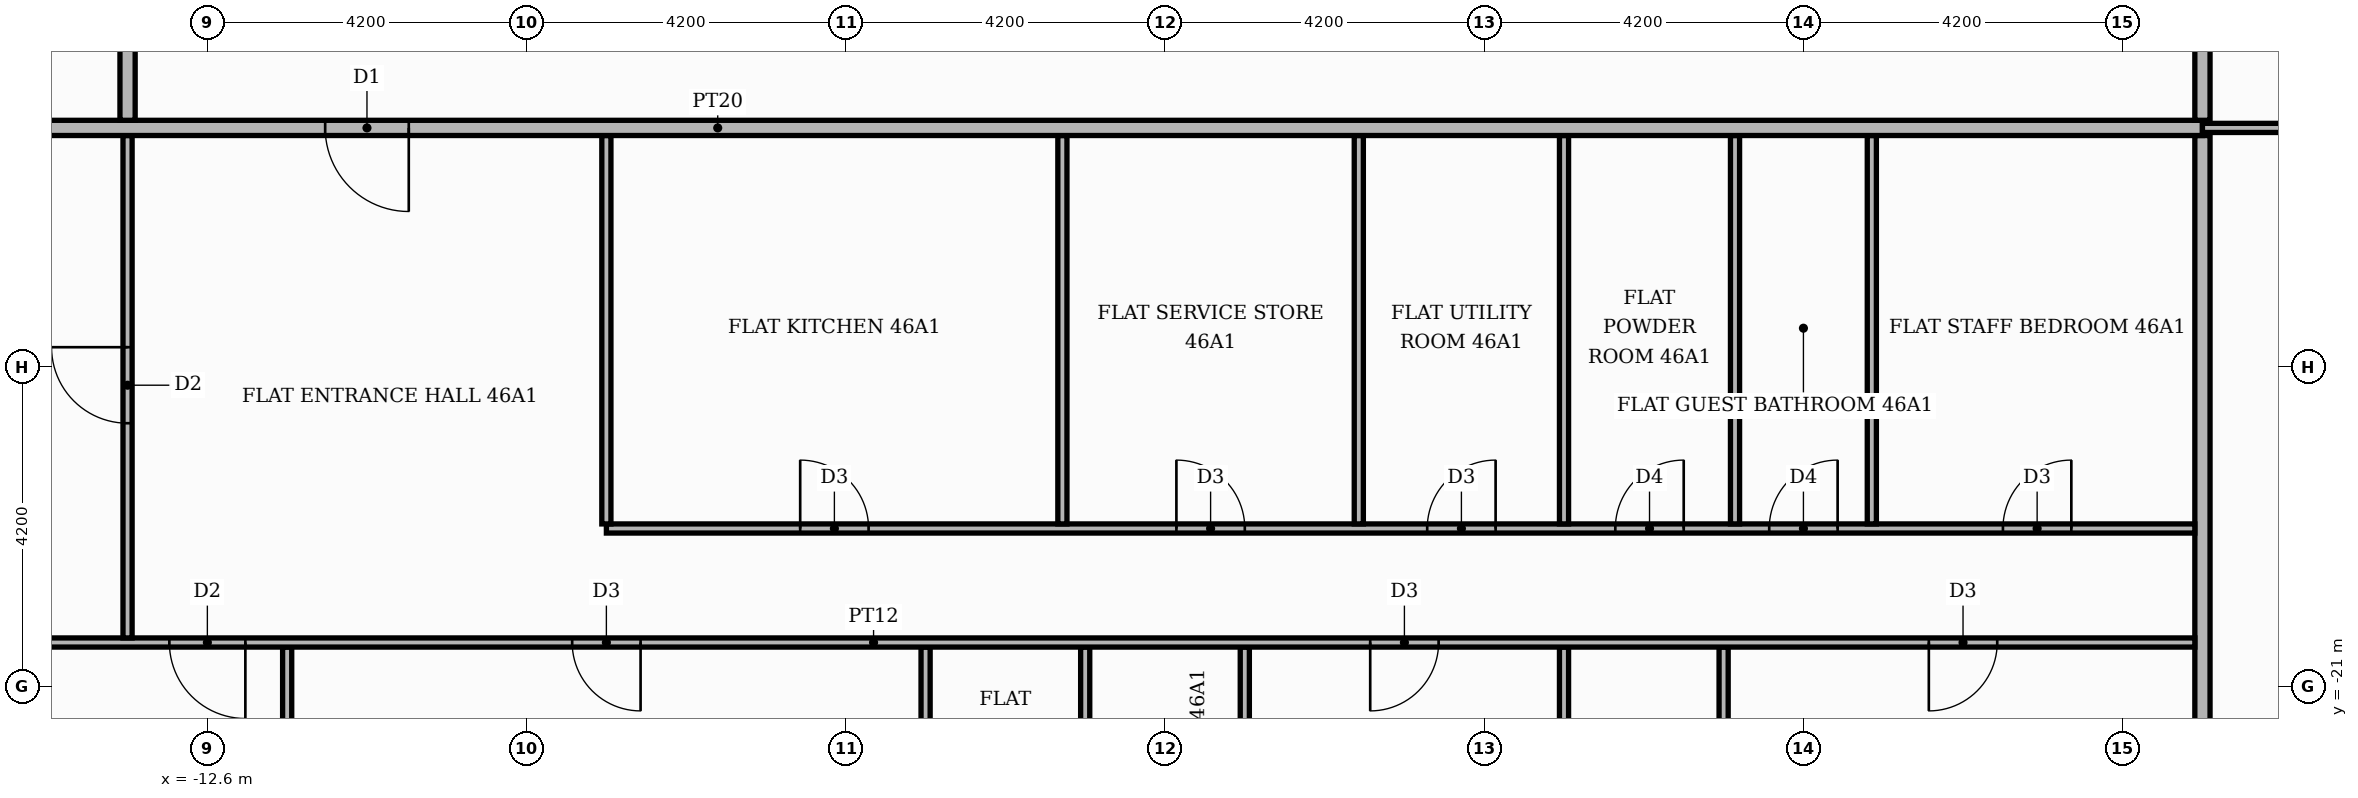
"""IFC4 building model, lengths in metres.
Left out: names, types, materials, properties, quantities, classifications, styles, units other than length and angle.
Written with IfcOpenShell. Run it as: python <this file> out.ifc"""

import sys

from ifc_helpers import new_model, si_unit, direction, frame, frame_2d, origin, place, context, subcontext, project, spatial, rectangle, extrude, element, fill, save


model = new_model("IFC4")
c1 = context("Model", 3, precision=1e-05, world=origin(), true_north=direction((0.0, 1.0)))
c2 = subcontext(c1, "Body", "Model", "MODEL_VIEW")
j1 = project(units=[si_unit("LENGTHUNIT", "METRE"), si_unit("PLANEANGLEUNIT", "RADIAN")], contexts=[c1])
p1 = place(None, origin())
s1 = spatial("IfcSite", under=j1, at=p1, CompositionType="ELEMENT")
p2 = place(p1, origin())
s2 = spatial("IfcBuilding", under=s1, at=p2, CompositionType="ELEMENT")
p3 = place(p2, frame((0.0, 0.0, 196.2)))
s3 = spatial("IfcBuildingStorey", under=s2, at=p3, CompositionType="ELEMENT", Elevation=196.2)
p4 = place(p3, frame((-11.55, -25.42, 0.0), z_axis=(0.0, 0.0, 1.0), x_axis=(0.0, 1.0, 0.0)))
e1 = element("IfcWall", 1, at=p4, inside=s3, PredefinedType="PARTITIONING", context=c2, shape_type="SweptSolid", body=[
    extrude(rectangle(XDim=4.94, YDim=0.12, at=frame_2d((2.47, 0.0))), origin(), (0.0, 0.0, 1.0), 3.48),
])
p5 = place(p3, frame((-3.15, -25.42, 0.0), z_axis=(0.0, 0.0, 1.0), x_axis=(0.0, 1.0, 0.0)))
e2 = element("IfcWall", 2, at=p5, inside=s3, PredefinedType="PARTITIONING", context=c2, shape_type="SweptSolid", body=[
    extrude(rectangle(XDim=4.94, YDim=0.12, at=frame_2d((2.47, 0.0))), origin(), (0.0, 0.0, 1.0), 3.48),
])
p6 = place(p5, frame((1.9, 0.0, 0.0)))
e3 = element("IfcOpeningElement", 3, at=p6, cuts=e2, PredefinedType="OPENING", context=c2, shape_type="SweptSolid", body=[
    extrude(rectangle(XDim=0.9, YDim=2.1, at=frame_2d((0.45, 1.05))), frame((0.0, 0.07, 0.0), z_axis=(0.0, -1.0, 0.0), x_axis=(1.0, 0.0, 0.0)), (0.0, 0.0, 1.0), 0.14),
])
p7 = place(p3, frame((-1.05, -25.42, 0.0), z_axis=(0.0, 0.0, 1.0), x_axis=(0.0, 1.0, 0.0)))
e4 = element("IfcWall", 4, at=p7, inside=s3, PredefinedType="PARTITIONING", context=c2, shape_type="SweptSolid", body=[
    extrude(rectangle(XDim=4.94, YDim=0.12, at=frame_2d((2.47, 0.0))), origin(), (0.0, 0.0, 1.0), 3.48),
])
p8 = place(p7, frame((1.9, 0.0, 0.0)))
e5 = element("IfcOpeningElement", 5, at=p8, cuts=e4, PredefinedType="OPENING", context=c2, shape_type="SweptSolid", body=[
    extrude(rectangle(XDim=0.9, YDim=2.1, at=frame_2d((0.45, 1.05))), frame((0.0, 0.07, 0.0), z_axis=(0.0, -1.0, 0.0), x_axis=(1.0, 0.0, 0.0)), (0.0, 0.0, 1.0), 0.14),
])
p9 = place(p3, frame((1.05, -25.42, 0.0), z_axis=(0.0, 0.0, 1.0), x_axis=(0.0, 1.0, 0.0)))
e6 = element("IfcWall", 6, at=p9, inside=s3, PredefinedType="PARTITIONING", context=c2, shape_type="SweptSolid", body=[
    extrude(rectangle(XDim=4.94, YDim=0.12, at=frame_2d((2.47, 0.0))), origin(), (0.0, 0.0, 1.0), 3.48),
])
p10 = place(p3, frame((5.25, -25.42, 0.0), z_axis=(0.0, 0.0, 1.0), x_axis=(0.0, 1.0, 0.0)))
e7 = element("IfcWall", 7, at=p10, inside=s3, PredefinedType="PARTITIONING", context=c2, shape_type="SweptSolid", body=[
    extrude(rectangle(XDim=4.94, YDim=0.12, at=frame_2d((2.47, 0.0))), origin(), (0.0, 0.0, 1.0), 3.48),
])
p11 = place(p10, frame((1.9, 0.0, 0.0)))
e8 = element("IfcOpeningElement", 8, at=p11, cuts=e7, PredefinedType="OPENING", context=c2, shape_type="SweptSolid", body=[
    extrude(rectangle(XDim=0.9, YDim=2.1, at=frame_2d((0.45, 1.05))), frame((0.0, 0.07, 0.0), z_axis=(0.0, -1.0, 0.0), x_axis=(1.0, 0.0, 0.0)), (0.0, 0.0, 1.0), 0.14),
])
p12 = place(p3, frame((7.35, -25.42, 0.0), z_axis=(0.0, 0.0, 1.0), x_axis=(0.0, 1.0, 0.0)))
e9 = element("IfcWall", 9, at=p12, inside=s3, PredefinedType="PARTITIONING", context=c2, shape_type="SweptSolid", body=[
    extrude(rectangle(XDim=4.94, YDim=0.12, at=frame_2d((2.47, 0.0))), origin(), (0.0, 0.0, 1.0), 3.48),
])
p13 = place(p3, frame((13.65, -25.42, 0.0), z_axis=(0.0, 0.0, 1.0), x_axis=(0.0, 1.0, 0.0)))
e10 = element("IfcWall", 10, at=p13, inside=s3, PredefinedType="PARTITIONING", context=c2, shape_type="SweptSolid", body=[
    extrude(rectangle(XDim=11.67, YDim=0.2, at=frame_2d((5.835, 0.0))), origin(), (0.0, 0.0, 1.0), 3.48),
])
p14 = place(p3, frame((-21.219, -20.42, 0.0), z_axis=(0.0, 0.0, 1.0), x_axis=(1.0, 0.0, 0.0)))
e11 = element("IfcWall", 11, at=p14, inside=s3, PredefinedType="PARTITIONING", context=c2, shape_type="SweptSolid", body=[
    extrude(rectangle(XDim=34.769, YDim=0.12, at=frame_2d((17.385, 0.0))), origin(), (0.0, 0.0, 1.0), 3.48),
])
p15 = place(p14, frame((8.119, 0.0, 0.0)))
e12 = element("IfcOpeningElement", 12, at=p15, cuts=e11, PredefinedType="OPENING", context=c2, shape_type="SweptSolid", body=[
    extrude(rectangle(XDim=1.0, YDim=2.1, at=frame_2d((0.5, 1.05))), frame((0.0, 0.07, 0.0), z_axis=(0.0, -1.0, 0.0), x_axis=(1.0, 0.0, 0.0)), (0.0, 0.0, 1.0), 0.14),
])
p16 = place(p14, frame((13.419, 0.0, 0.0)))
e13 = element("IfcOpeningElement", 13, at=p16, cuts=e11, PredefinedType="OPENING", context=c2, shape_type="SweptSolid", body=[
    extrude(rectangle(XDim=0.9, YDim=2.1, at=frame_2d((0.45, 1.05))), frame((0.0, 0.07, 0.0), z_axis=(0.0, -1.0, 0.0), x_axis=(1.0, 0.0, 0.0)), (0.0, 0.0, 1.0), 0.14),
])
p17 = place(p14, frame((23.919, 0.0, 0.0)))
e14 = element("IfcOpeningElement", 14, at=p17, cuts=e11, PredefinedType="OPENING", context=c2, shape_type="SweptSolid", body=[
    extrude(rectangle(XDim=0.9, YDim=2.1, at=frame_2d((0.45, 1.05))), frame((0.0, 0.07, 0.0), z_axis=(0.0, -1.0, 0.0), x_axis=(1.0, 0.0, 0.0)), (0.0, 0.0, 1.0), 0.14),
])
p18 = place(p14, frame((31.269, 0.0, 0.0)))
e15 = element("IfcOpeningElement", 15, at=p18, cuts=e11, PredefinedType="OPENING", context=c2, shape_type="SweptSolid", body=[
    extrude(rectangle(XDim=0.9, YDim=2.1, at=frame_2d((0.45, 1.05))), frame((0.0, 0.07, 0.0), z_axis=(0.0, -1.0, 0.0), x_axis=(1.0, 0.0, 0.0)), (0.0, 0.0, 1.0), 0.14),
])
p19 = place(p3, frame((-13.65, -20.36, 0.0), z_axis=(0.0, 0.0, 1.0), x_axis=(0.0, 1.0, 0.0)))
e16 = element("IfcWall", 16, at=p19, inside=s3, PredefinedType="PARTITIONING", context=c2, shape_type="SweptSolid", body=[
    extrude(rectangle(XDim=6.61, YDim=0.12, at=frame_2d((3.305, 0.0))), origin(), (0.0, 0.0, 1.0), 3.48),
])
p20 = place(p19, frame((2.825, 0.0, 0.0)))
e17 = element("IfcOpeningElement", 17, at=p20, cuts=e16, PredefinedType="OPENING", context=c2, shape_type="SweptSolid", body=[
    extrude(rectangle(XDim=1.0, YDim=2.1, at=frame_2d((0.5, 1.05))), frame((0.0, 0.07, 0.0), z_axis=(0.0, -1.0, 0.0), x_axis=(1.0, 0.0, 0.0)), (0.0, 0.0, 1.0), 0.14),
])
p21 = place(p3, frame((-7.35, -18.92, 0.0), z_axis=(0.0, 0.0, 1.0), x_axis=(1.0, 0.0, 0.0)))
e18 = element("IfcWall", 18, at=p21, inside=s3, PredefinedType="PARTITIONING", context=c2, shape_type="SweptSolid", body=[
    extrude(rectangle(XDim=20.9, YDim=0.12, at=frame_2d((10.45, 0.0))), origin(), (0.0, 0.0, 1.0), 3.48),
])
p22 = place(p21, frame((2.55, 0.0, 0.0)))
e19 = element("IfcOpeningElement", 19, at=p22, cuts=e18, PredefinedType="OPENING", context=c2, shape_type="SweptSolid", body=[
    extrude(rectangle(XDim=0.9, YDim=2.1, at=frame_2d((0.45, 1.05))), frame((0.0, 0.07, 0.0), z_axis=(0.0, -1.0, 0.0), x_axis=(1.0, 0.0, 0.0)), (0.0, 0.0, 1.0), 0.14),
])
p23 = place(p21, frame((7.5, 0.0, 0.0)))
e20 = element("IfcOpeningElement", 20, at=p23, cuts=e18, PredefinedType="OPENING", context=c2, shape_type="SweptSolid", body=[
    extrude(rectangle(XDim=0.9, YDim=2.1, at=frame_2d((0.45, 1.05))), frame((0.0, 0.07, 0.0), z_axis=(0.0, -1.0, 0.0), x_axis=(1.0, 0.0, 0.0)), (0.0, 0.0, 1.0), 0.14),
])
p24 = place(p21, frame((10.8, 0.0, 0.0)))
e21 = element("IfcOpeningElement", 21, at=p24, cuts=e18, PredefinedType="OPENING", context=c2, shape_type="SweptSolid", body=[
    extrude(rectangle(XDim=0.9, YDim=2.1, at=frame_2d((0.45, 1.05))), frame((0.0, 0.07, 0.0), z_axis=(0.0, -1.0, 0.0), x_axis=(1.0, 0.0, 0.0)), (0.0, 0.0, 1.0), 0.14),
])
p25 = place(p21, frame((13.275, 0.0, 0.0)))
e22 = element("IfcOpeningElement", 22, at=p25, cuts=e18, PredefinedType="OPENING", context=c2, shape_type="SweptSolid", body=[
    extrude(rectangle(XDim=0.9, YDim=2.1, at=frame_2d((0.45, 1.05))), frame((0.0, 0.07, 0.0), z_axis=(0.0, -1.0, 0.0), x_axis=(1.0, 0.0, 0.0)), (0.0, 0.0, 1.0), 0.14),
])
p26 = place(p21, frame((15.3, 0.0, 0.0)))
e23 = element("IfcOpeningElement", 23, at=p26, cuts=e18, PredefinedType="OPENING", context=c2, shape_type="SweptSolid", body=[
    extrude(rectangle(XDim=0.9, YDim=2.1, at=frame_2d((0.45, 1.05))), frame((0.0, 0.07, 0.0), z_axis=(0.0, -1.0, 0.0), x_axis=(1.0, 0.0, 0.0)), (0.0, 0.0, 1.0), 0.14),
])
p27 = place(p21, frame((18.375, 0.0, 0.0)))
e24 = element("IfcOpeningElement", 24, at=p27, cuts=e18, PredefinedType="OPENING", context=c2, shape_type="SweptSolid", body=[
    extrude(rectangle(XDim=0.9, YDim=2.1, at=frame_2d((0.45, 1.05))), frame((0.0, 0.07, 0.0), z_axis=(0.0, -1.0, 0.0), x_axis=(1.0, 0.0, 0.0)), (0.0, 0.0, 1.0), 0.14),
])
for number, where, z_axis, x_axis in (
    (25, (-7.35, -18.86, 0.0), (0.0, 0.0, 1.0), (0.0, 1.0, 0.0)),
    (26, (-1.35, -18.86, 0.0), (0.0, 0.0, 1.0), (0.0, 1.0, 0.0)),
    (27, (2.55, -18.86, 0.0), (0.0, 0.0, 1.0), (0.0, 1.0, 0.0)),
    (28, (5.25, -18.86, 0.0), (0.0, 0.0, 1.0), (0.0, 1.0, 0.0)),
    (29, (7.5, -18.86, 0.0), (0.0, 0.0, 1.0), (0.0, 1.0, 0.0)),
    (30, (9.3, -18.86, 0.0), (0.0, 0.0, 1.0), (0.0, 1.0, 0.0)),
):
    element("IfcWall", number, at=place(p3, frame(where, z_axis=z_axis, x_axis=x_axis)), inside=s3, PredefinedType="PARTITIONING", context=c2, shape_type="SweptSolid", body=[
        extrude(rectangle(XDim=5.11, YDim=0.12, at=frame_2d((2.555, 0.0))), origin(), (0.0, 0.0, 1.0), 3.48),
    ])
p28 = place(p3, frame((-25.42, -13.65, 0.0), z_axis=(0.0, 0.0, 1.0), x_axis=(1.0, 0.0, 0.0)))
e31 = element("IfcWall", 31, at=p28, inside=s3, PredefinedType="PARTITIONING", context=c2, shape_type="SweptSolid", body=[
    extrude(rectangle(XDim=39.07, YDim=0.2, at=frame_2d((19.535, 0.0))), origin(), (0.0, 0.0, 1.0), 3.48),
])
p29 = place(p28, frame((14.37, 0.0, 0.0)))
e32 = element("IfcOpeningElement", 32, at=p29, cuts=e31, PredefinedType="OPENING", context=c2, shape_type="SweptSolid", body=[
    extrude(rectangle(XDim=1.1, YDim=2.4, at=frame_2d((0.55, 1.2))), frame((0.0, 0.11, 0.0), z_axis=(0.0, -1.0, 0.0), x_axis=(1.0, 0.0, 0.0)), (0.0, 0.0, 1.0), 0.22),
])
p30 = place(p3, frame((13.65, -13.65, 0.0), z_axis=(0.0, 0.0, 1.0), x_axis=(1.0, 0.0, 0.0)))
e33 = element("IfcWall", 33, at=p30, inside=s3, PredefinedType="PARTITIONING", context=c2, shape_type="SweptSolid", body=[
    extrude(rectangle(XDim=7.07, YDim=0.12, at=frame_2d((3.535, 0.0))), origin(), (0.0, 0.0, 1.0), 3.48),
])
p31 = place(p30, frame((3.085, 0.0, 0.0)))
e34 = element("IfcOpeningElement", 34, at=p31, cuts=e33, PredefinedType="OPENING", context=c2, shape_type="SweptSolid", body=[
    extrude(rectangle(XDim=0.9, YDim=2.1, at=frame_2d((0.45, 1.05))), frame((0.0, 0.07, 0.0), z_axis=(0.0, -1.0, 0.0), x_axis=(1.0, 0.0, 0.0)), (0.0, 0.0, 1.0), 0.14),
])
p32 = place(p3, frame((-13.65, -13.55, 0.0), z_axis=(0.0, 0.0, 1.0), x_axis=(0.0, 1.0, 0.0)))
e35 = element("IfcWall", 35, at=p32, inside=s3, PredefinedType="PARTITIONING", context=c2, shape_type="SweptSolid", body=[
    extrude(rectangle(XDim=27.1, YDim=0.2, at=frame_2d((13.55, 0.0))), origin(), (0.0, 0.0, 1.0), 3.48),
])
p33 = place(p32, frame((23.5, 0.0, 0.0)))
e36 = element("IfcOpeningElement", 36, at=p33, cuts=e35, PredefinedType="OPENING", context=c2, shape_type="SweptSolid", body=[
    extrude(rectangle(XDim=1.1, YDim=2.4, at=frame_2d((0.55, 1.2))), frame((0.0, 0.11, 0.0), z_axis=(0.0, -1.0, 0.0), x_axis=(1.0, 0.0, 0.0)), (0.0, 0.0, 1.0), 0.22),
])
p34 = place(p3, frame((13.65, -13.55, 0.0), z_axis=(0.0, 0.0, 1.0), x_axis=(0.0, 1.0, 0.0)))
e37 = element("IfcWall", 37, at=p34, inside=s3, PredefinedType="PARTITIONING", context=c2, shape_type="SweptSolid", body=[
    extrude(rectangle(XDim=2.45, YDim=0.2, at=frame_2d((1.225, 0.0))), origin(), (0.0, 0.0, 1.0), 3.48),
])
p35 = place(p29, frame((1.1, 0.0, 0.0), z_axis=(0.0, 0.0, 1.0), x_axis=(-1.0, 0.0, 0.0)))
e38 = element("IfcDoor", 38, at=p35, inside=s3, OperationType="SINGLE_SWING_RIGHT", PredefinedType="DOOR", context=c2, shape_type="SweptSolid", body=[
    extrude(rectangle(XDim=1.1, YDim=2.4, at=frame_2d((0.55, 1.2))), frame((0.0, 0.025, 0.0), z_axis=(0.0, -1.0, 0.0), x_axis=(1.0, 0.0, 0.0)), (0.0, 0.0, 1.0), 0.05),
])
fill(e32, e38)
p36 = place(p20, origin())
e39 = element("IfcDoor", 39, at=p36, inside=s3, OperationType="SINGLE_SWING_RIGHT", PredefinedType="DOOR", context=c2, shape_type="SweptSolid", body=[
    extrude(rectangle(XDim=1.0, YDim=2.1, at=frame_2d((0.5, 1.05))), frame((0.0, 0.025, 0.0), z_axis=(0.0, -1.0, 0.0), x_axis=(1.0, 0.0, 0.0)), (0.0, 0.0, 1.0), 0.05),
])
fill(e17, e39)
p37 = place(p22, origin())
e40 = element("IfcDoor", 40, at=p37, inside=s3, OperationType="SINGLE_SWING_LEFT", PredefinedType="DOOR", context=c2, shape_type="SweptSolid", body=[
    extrude(rectangle(XDim=0.9, YDim=2.1, at=frame_2d((0.45, 1.05))), frame((0.0, 0.025, 0.0), z_axis=(0.0, -1.0, 0.0), x_axis=(1.0, 0.0, 0.0)), (0.0, 0.0, 1.0), 0.05),
])
fill(e19, e40)
p38 = place(p23, origin())
e41 = element("IfcDoor", 41, at=p38, inside=s3, OperationType="SINGLE_SWING_LEFT", PredefinedType="DOOR", context=c2, shape_type="SweptSolid", body=[
    extrude(rectangle(XDim=0.9, YDim=2.1, at=frame_2d((0.45, 1.05))), frame((0.0, 0.025, 0.0), z_axis=(0.0, -1.0, 0.0), x_axis=(1.0, 0.0, 0.0)), (0.0, 0.0, 1.0), 0.05),
])
fill(e20, e41)
p39 = place(p24, origin())
e42 = element("IfcDoor", 42, at=p39, inside=s3, OperationType="SINGLE_SWING_RIGHT", PredefinedType="DOOR", context=c2, shape_type="SweptSolid", body=[
    extrude(rectangle(XDim=0.9, YDim=2.1, at=frame_2d((0.45, 1.05))), frame((0.0, 0.025, 0.0), z_axis=(0.0, -1.0, 0.0), x_axis=(1.0, 0.0, 0.0)), (0.0, 0.0, 1.0), 0.05),
])
fill(e21, e42)
p40 = place(p25, origin())
e43 = element("IfcDoor", 43, at=p40, inside=s3, OperationType="SINGLE_SWING_RIGHT", PredefinedType="DOOR", context=c2, shape_type="SweptSolid", body=[
    extrude(rectangle(XDim=0.9, YDim=2.1, at=frame_2d((0.45, 1.05))), frame((0.0, 0.025, 0.0), z_axis=(0.0, -1.0, 0.0), x_axis=(1.0, 0.0, 0.0)), (0.0, 0.0, 1.0), 0.05),
])
fill(e22, e43)
p41 = place(p26, origin())
e44 = element("IfcDoor", 44, at=p41, inside=s3, OperationType="SINGLE_SWING_RIGHT", PredefinedType="DOOR", context=c2, shape_type="SweptSolid", body=[
    extrude(rectangle(XDim=0.9, YDim=2.1, at=frame_2d((0.45, 1.05))), frame((0.0, 0.025, 0.0), z_axis=(0.0, -1.0, 0.0), x_axis=(1.0, 0.0, 0.0)), (0.0, 0.0, 1.0), 0.05),
])
fill(e23, e44)
p42 = place(p27, origin())
e45 = element("IfcDoor", 45, at=p42, inside=s3, OperationType="SINGLE_SWING_RIGHT", PredefinedType="DOOR", context=c2, shape_type="SweptSolid", body=[
    extrude(rectangle(XDim=0.9, YDim=2.1, at=frame_2d((0.45, 1.05))), frame((0.0, 0.025, 0.0), z_axis=(0.0, -1.0, 0.0), x_axis=(1.0, 0.0, 0.0)), (0.0, 0.0, 1.0), 0.05),
])
fill(e24, e45)
p43 = place(p15, frame((1.0, 0.0, 0.0), z_axis=(0.0, 0.0, 1.0), x_axis=(-1.0, 0.0, 0.0)))
e46 = element("IfcDoor", 46, at=p43, inside=s3, OperationType="SINGLE_SWING_RIGHT", PredefinedType="DOOR", context=c2, shape_type="SweptSolid", body=[
    extrude(rectangle(XDim=1.0, YDim=2.1, at=frame_2d((0.5, 1.05))), frame((0.0, 0.025, 0.0), z_axis=(0.0, -1.0, 0.0), x_axis=(1.0, 0.0, 0.0)), (0.0, 0.0, 1.0), 0.05),
])
fill(e12, e46)
p44 = place(p16, frame((0.9, 0.0, 0.0), z_axis=(0.0, 0.0, 1.0), x_axis=(-1.0, 0.0, 0.0)))
e47 = element("IfcDoor", 47, at=p44, inside=s3, OperationType="SINGLE_SWING_RIGHT", PredefinedType="DOOR", context=c2, shape_type="SweptSolid", body=[
    extrude(rectangle(XDim=0.9, YDim=2.1, at=frame_2d((0.45, 1.05))), frame((0.0, 0.025, 0.0), z_axis=(0.0, -1.0, 0.0), x_axis=(1.0, 0.0, 0.0)), (0.0, 0.0, 1.0), 0.05),
])
fill(e13, e47)
p45 = place(p17, frame((0.9, 0.0, 0.0), z_axis=(0.0, 0.0, 1.0), x_axis=(-1.0, 0.0, 0.0)))
e48 = element("IfcDoor", 48, at=p45, inside=s3, OperationType="SINGLE_SWING_LEFT", PredefinedType="DOOR", context=c2, shape_type="SweptSolid", body=[
    extrude(rectangle(XDim=0.9, YDim=2.1, at=frame_2d((0.45, 1.05))), frame((0.0, 0.025, 0.0), z_axis=(0.0, -1.0, 0.0), x_axis=(1.0, 0.0, 0.0)), (0.0, 0.0, 1.0), 0.05),
])
fill(e14, e48)
p46 = place(p18, frame((0.9, 0.0, 0.0), z_axis=(0.0, 0.0, 1.0), x_axis=(-1.0, 0.0, 0.0)))
e49 = element("IfcDoor", 49, at=p46, inside=s3, OperationType="SINGLE_SWING_LEFT", PredefinedType="DOOR", context=c2, shape_type="SweptSolid", body=[
    extrude(rectangle(XDim=0.9, YDim=2.1, at=frame_2d((0.45, 1.05))), frame((0.0, 0.025, 0.0), z_axis=(0.0, -1.0, 0.0), x_axis=(1.0, 0.0, 0.0)), (0.0, 0.0, 1.0), 0.05),
])
fill(e15, e49)
save(model, sys.argv[1])
